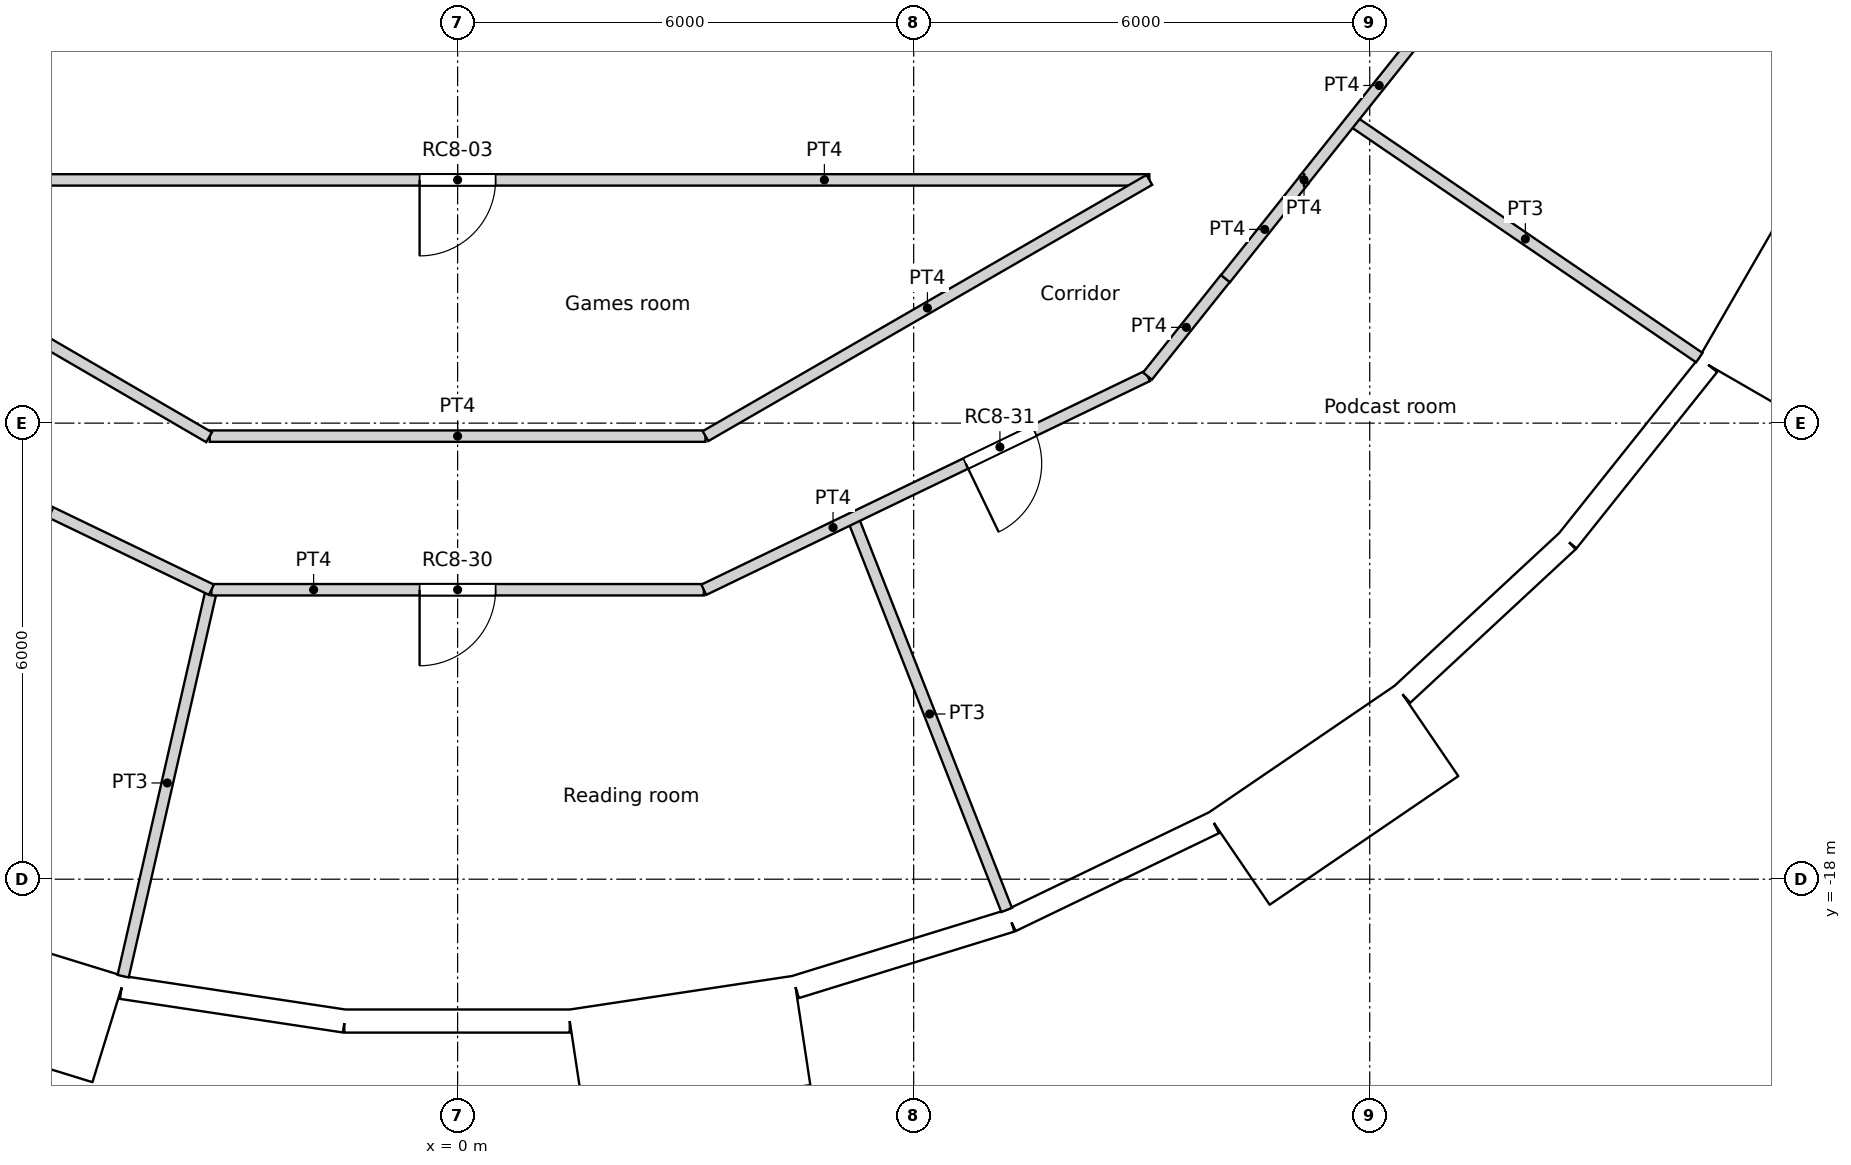
"""IFC4 building model, lengths in metres.
Left out: names, types, materials, properties, quantities, classifications, styles, units other than length and angle.
Written with IfcOpenShell. Run it as: python <this file> out.ifc"""

import sys

from ifc_helpers import new_model, si_unit, direction, frame, frame_2d, origin, origin_2d, place, context, subcontext, project, spatial, rectangle, circle, extrude, element, fill, save


model = new_model("IFC4")
c1 = context("Model", 3, precision=1e-05, world=origin(), true_north=direction((0.0, 1.0)))
c2 = subcontext(c1, "Body", "Model", "MODEL_VIEW")
j1 = project(units=[si_unit("LENGTHUNIT", "METRE"), si_unit("PLANEANGLEUNIT", "RADIAN")], contexts=[c1])
p1 = place(None, origin())
s1 = spatial("IfcSite", under=j1, at=p1, CompositionType="ELEMENT")
p2 = place(p1, origin())
s2 = spatial("IfcBuilding", under=s1, at=p2, CompositionType="ELEMENT")
p3 = place(p2, frame((0.0, 0.0, 305.4)))
s3 = spatial("IfcBuildingStorey", under=s2, at=p3, CompositionType="ELEMENT", Elevation=305.4)
for number, where, z_axis, x_axis in (
    (1, (-4.188, -18.35, 0.0), (0.0, 0.0, 1.0), (1.0, 0.0, 0.0)),
    (2, (1.406, -18.77, 0.0), (0.0, 0.0, 1.0), (1.0, 0.0, 0.0)),
    (3, (6.876, -17.521, 0.0), (0.0, 0.0, 1.0), (1.0, 0.0, 0.0)),
    (4, (11.735, -14.716, 0.0), (0.0, 0.0, 1.0), (1.0, 0.0, 0.0)),
    (5, (15.552, -10.603, 0.0), (0.0, 0.0, 1.0), (1.0, 0.0, 0.0)),
):
    element("IfcColumn", number, at=place(p3, frame(where, z_axis=z_axis, x_axis=x_axis)), inside=s3, PredefinedType="COLUMN", context=c2, shape_type="SweptSolid", body=[
        extrude(circle(Radius=0.45, at=origin_2d()), origin(), (0.0, 0.0, 1.0), 3.6),
    ])
p4 = place(p3, frame((-7.458, -19.091, -0.35), z_axis=(0.0, 0.0, 1.0), x_axis=(0.955571139978, -0.294760574774, 0.0)))
e6 = element("IfcWall", 6, at=p4, inside=s3, PredefinedType="ELEMENTEDWALL", context=c2, shape_type="SweptSolid", body=[
    extrude(rectangle(XDim=3.0, YDim=1.45, at=frame_2d((1.5, 0.0))), origin(), (0.0, 0.0, 1.0), 3.6),
])
p5 = place(p4, frame((1.5, 0.0, 1.9)))
e7 = element("IfcOpeningElement", 7, at=p5, cuts=e6, PredefinedType="OPENING", context=c2, shape_type="SweptSolid", body=[
    extrude(circle(Radius=0.9, at=origin_2d()), frame((0.0, 0.735, 0.0), z_axis=(0.0, -1.0, 0.0), x_axis=(1.0, 0.0, 0.0)), (0.0, 0.0, 1.0), 1.47),
])
p6 = place(p3, frame((-4.418, -19.425, 0.0), z_axis=(0.0, 0.0, 1.0), x_axis=(0.988835775663, -0.149009425104, 0.0)))
e8 = element("IfcWall", 8, at=p6, inside=s3, PredefinedType="SOLIDWALL", context=c2, shape_type="SweptSolid", body=[
    extrude(rectangle(XDim=2.962, YDim=0.3, at=frame_2d((1.481, 0.0))), origin(), (0.0, 0.0, 1.0), 2.8),
])
p7 = place(p6, frame((1.481, 0.0, 1.55)))
e9 = element("IfcOpeningElement", 9, at=p7, cuts=e8, PredefinedType="OPENING", context=c2, shape_type="SweptSolid", body=[
    extrude(circle(Radius=0.9, at=origin_2d()), frame((0.0, 0.16, 0.0), z_axis=(0.0, -1.0, 0.0), x_axis=(1.0, 0.0, 0.0)), (0.0, 0.0, 1.0), 0.32),
])
p8 = place(p3, frame((-1.489, -19.866, 0.0), z_axis=(0.0, 0.0, 1.0), x_axis=(1.0, 0.0, 0.0)))
e10 = element("IfcWall", 10, at=p8, inside=s3, PredefinedType="SOLIDWALL", context=c2, shape_type="SweptSolid", body=[
    extrude(rectangle(XDim=2.962, YDim=0.3, at=frame_2d((1.481, 0.0))), origin(), (0.0, 0.0, 1.0), 3.25),
])
p9 = place(p8, frame((1.481, 0.0, 1.55)))
e11 = element("IfcOpeningElement", 11, at=p9, cuts=e10, PredefinedType="OPENING", context=c2, shape_type="SweptSolid", body=[
    extrude(circle(Radius=0.9, at=origin_2d()), frame((0.0, 0.16, 0.0), z_axis=(0.0, -1.0, 0.0), x_axis=(1.0, 0.0, 0.0)), (0.0, 0.0, 1.0), 0.32),
])
p10 = place(p3, frame((1.563, -20.436, -0.35), z_axis=(0.0, 0.0, 1.0), x_axis=(0.988836445254, 0.149004981587, 0.0)))
e12 = element("IfcWall", 12, at=p10, inside=s3, PredefinedType="ELEMENTEDWALL", context=c2, shape_type="SweptSolid", body=[
    extrude(rectangle(XDim=3.0, YDim=1.45, at=frame_2d((1.5, 0.0))), origin(), (0.0, 0.0, 1.0), 3.6),
])
p11 = place(p10, frame((1.5, 0.0, 1.9)))
e13 = element("IfcOpeningElement", 13, at=p11, cuts=e12, PredefinedType="OPENING", context=c2, shape_type="SweptSolid", body=[
    extrude(circle(Radius=0.9, at=origin_2d()), frame((0.0, 0.735, 0.0), z_axis=(0.0, -1.0, 0.0), x_axis=(1.0, 0.0, 0.0)), (0.0, 0.0, 1.0), 1.47),
])
p12 = place(p3, frame((4.448, -19.418, 0.0), z_axis=(0.0, 0.0, 1.0), x_axis=(0.95558635705, 0.294711238707, 0.0)))
e14 = element("IfcWall", 14, at=p12, inside=s3, PredefinedType="SOLIDWALL", context=c2, shape_type="SweptSolid", body=[
    extrude(rectangle(XDim=2.962, YDim=0.3, at=frame_2d((1.481, 0.0))), origin(), (0.0, 0.0, 1.0), 2.8),
])
p13 = place(p12, frame((1.481, 0.0, 1.55)))
e15 = element("IfcOpeningElement", 15, at=p13, cuts=e14, PredefinedType="OPENING", context=c2, shape_type="SweptSolid", body=[
    extrude(circle(Radius=0.9, at=origin_2d()), frame((0.0, 0.16, 0.0), z_axis=(0.0, -1.0, 0.0), x_axis=(1.0, 0.0, 0.0)), (0.0, 0.0, 1.0), 0.32),
])
p14 = place(p3, frame((7.278, -18.545, 0.0), z_axis=(0.0, 0.0, 1.0), x_axis=(0.900939615635, 0.433944476838, 0.0)))
e16 = element("IfcWall", 16, at=p14, inside=s3, PredefinedType="SOLIDWALL", context=c2, shape_type="SweptSolid", body=[
    extrude(rectangle(XDim=2.962, YDim=0.3, at=frame_2d((1.481, 0.0))), origin(), (0.0, 0.0, 1.0), 3.25),
])
p15 = place(p14, frame((1.481, 0.0, 1.55)))
e17 = element("IfcOpeningElement", 17, at=p15, cuts=e16, PredefinedType="OPENING", context=c2, shape_type="SweptSolid", body=[
    extrude(circle(Radius=0.9, at=origin_2d()), frame((0.0, 0.16, 0.0), z_axis=(0.0, -1.0, 0.0), x_axis=(1.0, 0.0, 0.0)), (0.0, 0.0, 1.0), 0.32),
])
p16 = place(p3, frame((10.275, -17.734, -0.35), z_axis=(0.0, 0.0, 1.0), x_axis=(0.826246281157, 0.563309047392, 0.0)))
e18 = element("IfcWall", 18, at=p16, inside=s3, PredefinedType="ELEMENTEDWALL", context=c2, shape_type="SweptSolid", body=[
    extrude(rectangle(XDim=3.0, YDim=1.45, at=frame_2d((1.5, 0.0))), origin(), (0.0, 0.0, 1.0), 3.6),
])
p17 = place(p16, frame((1.5, 0.0, 1.9)))
e19 = element("IfcOpeningElement", 19, at=p17, cuts=e18, PredefinedType="OPENING", context=c2, shape_type="SweptSolid", body=[
    extrude(circle(Radius=0.9, at=origin_2d()), frame((0.0, 0.735, 0.0), z_axis=(0.0, -1.0, 0.0), x_axis=(1.0, 0.0, 0.0)), (0.0, 0.0, 1.0), 1.47),
])
p18 = place(p3, frame((12.432, -15.565, 0.0), z_axis=(0.0, 0.0, 1.0), x_axis=(0.733066412643, 0.680157066165, 0.0)))
e20 = element("IfcWall", 20, at=p18, inside=s3, PredefinedType="SOLIDWALL", context=c2, shape_type="SweptSolid", body=[
    extrude(rectangle(XDim=2.962, YDim=0.3, at=frame_2d((1.481, 0.0))), origin(), (0.0, 0.0, 1.0), 2.8),
])
p19 = place(p18, frame((1.481, 0.0, 1.55)))
e21 = element("IfcOpeningElement", 21, at=p19, cuts=e20, PredefinedType="OPENING", context=c2, shape_type="SweptSolid", body=[
    extrude(circle(Radius=0.9, at=origin_2d()), frame((0.0, 0.16, 0.0), z_axis=(0.0, -1.0, 0.0), x_axis=(1.0, 0.0, 0.0)), (0.0, 0.0, 1.0), 0.32),
])
p20 = place(p3, frame((14.604, -13.55, 0.0), z_axis=(0.0, 0.0, 1.0), x_axis=(0.623498236992, 0.781824755599, 0.0)))
e22 = element("IfcWall", 22, at=p20, inside=s3, PredefinedType="SOLIDWALL", context=c2, shape_type="SweptSolid", body=[
    extrude(rectangle(XDim=2.962, YDim=0.3, at=frame_2d((1.481, 0.0))), origin(), (0.0, 0.0, 1.0), 3.25),
])
p21 = place(p20, frame((1.481, 0.0, 1.55)))
e23 = element("IfcOpeningElement", 23, at=p21, cuts=e22, PredefinedType="OPENING", context=c2, shape_type="SweptSolid", body=[
    extrude(circle(Radius=0.9, at=origin_2d()), frame((0.0, 0.16, 0.0), z_axis=(0.0, -1.0, 0.0), x_axis=(1.0, 0.0, 0.0)), (0.0, 0.0, 1.0), 0.32),
])
p22 = place(p3, frame((16.952, -11.52, -0.35), z_axis=(0.0, 0.0, 1.0), x_axis=(0.499990139034, 0.866031096941, 0.0)))
e24 = element("IfcWall", 24, at=p22, inside=s3, PredefinedType="ELEMENTEDWALL", context=c2, shape_type="SweptSolid", body=[
    extrude(rectangle(XDim=3.0, YDim=1.45, at=frame_2d((1.5, 0.0))), origin(), (0.0, 0.0, 1.0), 3.6),
])
p23 = place(p22, frame((1.5, 0.0, 1.9)))
e25 = element("IfcOpeningElement", 25, at=p23, cuts=e24, PredefinedType="OPENING", context=c2, shape_type="SweptSolid", body=[
    extrude(circle(Radius=0.9, at=origin_2d()), frame((0.0, 0.735, 0.0), z_axis=(0.0, -1.0, 0.0), x_axis=(1.0, 0.0, 0.0)), (0.0, 0.0, 1.0), 1.47),
])
p24 = place(p3, frame((-9.092, -8.8, 0.0), z_axis=(0.0, 0.0, 1.0), x_axis=(1.0, 0.0, 0.0)))
e26 = element("IfcWall", 26, at=p24, inside=s3, PredefinedType="PARTITIONING", context=c2, shape_type="SweptSolid", body=[
    extrude(rectangle(XDim=18.193, YDim=0.15, at=frame_2d((9.096, 0.0))), origin(), (0.0, 0.0, 1.0), 3.25),
])
p25 = place(p24, frame((8.592, 0.0, 0.0)))
e27 = element("IfcOpeningElement", 27, at=p25, cuts=e26, PredefinedType="OPENING", context=c2, shape_type="SweptSolid", body=[
    extrude(rectangle(XDim=1.0, YDim=2.04, at=frame_2d((0.5, 1.02))), frame((0.0, 0.075, 0.0), z_axis=(0.0, -1.0, 0.0), x_axis=(1.0, 0.0, 0.0)), (0.0, 0.0, 1.0), 0.15),
])
p26 = place(p3, frame((-9.092, -8.8, 0.0), z_axis=(0.0, 0.0, 1.0), x_axis=(0.864470922103, -0.502682827277, 0.0)))
e28 = element("IfcWall", 28, at=p26, inside=s3, PredefinedType="PARTITIONING", context=c2, shape_type="SweptSolid", body=[
    extrude(rectangle(XDim=6.735, YDim=0.15, at=frame_2d((3.368, 0.0))), origin(), (0.0, 0.0, 1.0), 3.25),
])
p27 = place(p3, frame((11.137, -8.8, 0.0), z_axis=(0.0, 0.0, 1.0), x_axis=(-1.0, 0.0, 0.0)))
e29 = element("IfcWall", 29, at=p27, inside=s3, PredefinedType="PARTITIONING", context=c2, shape_type="SweptSolid", body=[
    extrude(rectangle(XDim=0.003, YDim=0.15, at=frame_2d((0.001, 0.0))), origin(), (0.0, 0.0, 1.0), 3.25),
])
p28 = place(p3, frame((10.101, -10.101, 0.0), z_axis=(0.0, 0.0, 1.0), x_axis=(0.623098344652, 0.782143498913, 0.0)))
e30 = element("IfcWall", 30, at=p28, inside=s3, PredefinedType="PARTITIONING", context=c2, shape_type="SweptSolid", body=[
    extrude(rectangle(XDim=1.661, YDim=0.15, at=frame_2d((0.831, 0.0))), origin(), (0.0, 0.0, 1.0), 3.25),
])
p29 = place(p3, frame((11.134, -8.8, 0.0), z_axis=(0.0, 0.0, 1.0), x_axis=(0.623560523309, 0.781775078761, 0.0)))
e31 = element("IfcWall", 31, at=p29, inside=s3, PredefinedType="PARTITIONING", context=c2, shape_type="SweptSolid", body=[
    extrude(rectangle(XDim=3.177, YDim=0.15, at=frame_2d((1.589, 0.0))), origin(), (0.0, 0.0, 1.0), 3.25),
])
p30 = place(p3, frame((-3.261, -12.171, 0.0), z_axis=(0.0, 0.0, 1.0), x_axis=(1.0, 0.0, 0.0)))
e32 = element("IfcWall", 32, at=p30, inside=s3, PredefinedType="PARTITIONING", context=c2, shape_type="SweptSolid", body=[
    extrude(rectangle(XDim=6.522, YDim=0.15, at=frame_2d((3.261, 0.0))), origin(), (0.0, 0.0, 1.0), 3.25),
])
p31 = place(p3, frame((3.261, -12.171, 0.0), z_axis=(0.0, 0.0, 1.0), x_axis=(0.866066809554, 0.499928276245, 0.0)))
e33 = element("IfcWall", 33, at=p31, inside=s3, PredefinedType="PARTITIONING", context=c2, shape_type="SweptSolid", body=[
    extrude(rectangle(XDim=6.743, YDim=0.15, at=frame_2d((3.371, 0.0))), origin(), (0.0, 0.0, 1.0), 3.25),
])
p32 = place(p3, frame((-9.076, -11.381, 0.0), z_axis=(0.0, 0.0, 1.0), x_axis=(0.900976027191, -0.433868872388, 0.0)))
e34 = element("IfcWall", 34, at=p32, inside=s3, PredefinedType="PARTITIONING", context=c2, shape_type="SweptSolid", body=[
    extrude(rectangle(XDim=6.479, YDim=0.15, at=frame_2d((3.239, 0.0))), origin(), (0.0, 0.0, 1.0), 3.25),
])
p33 = place(p32, frame((2.34, 0.0, 0.0)))
e35 = element("IfcOpeningElement", 35, at=p33, cuts=e34, PredefinedType="OPENING", context=c2, shape_type="SweptSolid", body=[
    extrude(rectangle(XDim=1.8, YDim=2.1, at=frame_2d((0.9, 1.05))), frame((0.0, 0.075, 0.0), z_axis=(0.0, -1.0, 0.0), x_axis=(1.0, 0.0, 0.0)), (0.0, 0.0, 1.0), 0.15),
])
p34 = place(p3, frame((3.239, -14.192, 0.0), z_axis=(0.0, 0.0, 1.0), x_axis=(0.900851590682, 0.434127183629, 0.0)))
e36 = element("IfcWall", 36, at=p34, inside=s3, PredefinedType="PARTITIONING", context=c2, shape_type="SweptSolid", body=[
    extrude(rectangle(XDim=6.479, YDim=0.15, at=frame_2d((3.239, 0.0))), origin(), (0.0, 0.0, 1.0), 3.25),
])
p35 = place(p34, frame((3.825, 0.0, 0.0)))
e37 = element("IfcOpeningElement", 37, at=p35, cuts=e36, PredefinedType="OPENING", context=c2, shape_type="SweptSolid", body=[
    extrude(rectangle(XDim=1.0, YDim=2.04, at=frame_2d((0.5, 1.02))), frame((0.0, 0.075, 0.0), z_axis=(0.0, -1.0, 0.0), x_axis=(1.0, 0.0, 0.0)), (0.0, 0.0, 1.0), 0.15),
])
p36 = place(p3, frame((-3.239, -14.192, 0.0), z_axis=(0.0, 0.0, 1.0), x_axis=(1.0, 0.0, 0.0)))
e38 = element("IfcWall", 38, at=p36, inside=s3, PredefinedType="PARTITIONING", context=c2, shape_type="SweptSolid", body=[
    extrude(rectangle(XDim=6.478, YDim=0.15, at=frame_2d((3.239, 0.0))), origin(), (0.0, 0.0, 1.0), 3.25),
])
p37 = place(p36, frame((2.739, 0.0, 0.0)))
e39 = element("IfcOpeningElement", 39, at=p37, cuts=e38, PredefinedType="OPENING", context=c2, shape_type="SweptSolid", body=[
    extrude(rectangle(XDim=1.0, YDim=2.04, at=frame_2d((0.5, 1.02))), frame((0.0, 0.075, 0.0), z_axis=(0.0, -1.0, 0.0), x_axis=(1.0, 0.0, 0.0)), (0.0, 0.0, 1.0), 0.15),
])
p38 = place(p3, frame((9.076, -11.381, 0.0), z_axis=(0.0, 0.0, 1.0), x_axis=(0.623805208652, 0.781579849829, 0.0)))
e40 = element("IfcWall", 40, at=p38, inside=s3, PredefinedType="PARTITIONING", context=c2, shape_type="SweptSolid", body=[
    extrude(rectangle(XDim=1.64, YDim=0.15, at=frame_2d((0.82, 0.0))), origin(), (0.0, 0.0, 1.0), 3.25),
])
p39 = place(p3, frame((-4.4, -19.276, 0.0), z_axis=(0.0, 0.0, 1.0), x_axis=(0.222612505682, 0.974907007008, 0.0)))
e41 = element("IfcWall", 41, at=p39, inside=s3, PredefinedType="PARTITIONING", context=c2, shape_type="SweptSolid", body=[
    extrude(rectangle(XDim=5.215, YDim=0.15, at=frame_2d((2.607, 0.0))), origin(), (0.0, 0.0, 1.0), 3.25),
])
p40 = place(p3, frame((5.199, -13.248, 0.0), z_axis=(0.0, 0.0, 1.0), x_axis=(0.365334662456, -0.930876245485, 0.0)))
e42 = element("IfcWall", 42, at=p40, inside=s3, PredefinedType="PARTITIONING", context=c2, shape_type="SweptSolid", body=[
    extrude(rectangle(XDim=5.54, YDim=0.15, at=frame_2d((2.77, 0.0))), origin(), (0.0, 0.0, 1.0), 3.25),
])
p41 = place(p3, frame((11.759, -8.017, 0.0), z_axis=(0.0, 0.0, 1.0), x_axis=(0.826207761897, -0.563365542238, 0.0)))
e43 = element("IfcWall", 43, at=p41, inside=s3, PredefinedType="PARTITIONING", context=c2, shape_type="SweptSolid", body=[
    extrude(rectangle(XDim=5.54, YDim=0.15, at=frame_2d((2.77, 0.0))), origin(), (0.0, 0.0, 1.0), 3.25),
])
p42 = place(p5, origin())
e44 = element("IfcWindow", 44, at=p42, inside=s3, PartitioningType="SINGLE_PANEL", PredefinedType="WINDOW", context=c2, shape_type="SweptSolid", body=[
    extrude(circle(Radius=0.9, at=origin_2d()), frame((0.0, 0.695, 0.0), z_axis=(0.0, -1.0, 0.0), x_axis=(1.0, 0.0, 0.0)), (0.0, 0.0, 1.0), 0.1),
])
fill(e7, e44)
p43 = place(p7, origin())
e45 = element("IfcWindow", 45, at=p43, inside=s3, PartitioningType="SINGLE_PANEL", PredefinedType="WINDOW", context=c2, shape_type="SweptSolid", body=[
    extrude(circle(Radius=0.9, at=origin_2d()), frame((0.0, 0.12, 0.0), z_axis=(0.0, -1.0, 0.0), x_axis=(1.0, 0.0, 0.0)), (0.0, 0.0, 1.0), 0.1),
])
fill(e9, e45)
p44 = place(p9, origin())
e46 = element("IfcWindow", 46, at=p44, inside=s3, PartitioningType="SINGLE_PANEL", PredefinedType="WINDOW", context=c2, shape_type="SweptSolid", body=[
    extrude(circle(Radius=0.9, at=origin_2d()), frame((0.0, 0.12, 0.0), z_axis=(0.0, -1.0, 0.0), x_axis=(1.0, 0.0, 0.0)), (0.0, 0.0, 1.0), 0.1),
])
fill(e11, e46)
p45 = place(p11, origin())
e47 = element("IfcWindow", 47, at=p45, inside=s3, PartitioningType="SINGLE_PANEL", PredefinedType="WINDOW", context=c2, shape_type="SweptSolid", body=[
    extrude(circle(Radius=0.9, at=origin_2d()), frame((0.0, 0.695, 0.0), z_axis=(0.0, -1.0, 0.0), x_axis=(1.0, 0.0, 0.0)), (0.0, 0.0, 1.0), 0.1),
])
fill(e13, e47)
p46 = place(p13, origin())
e48 = element("IfcWindow", 48, at=p46, inside=s3, PartitioningType="SINGLE_PANEL", PredefinedType="WINDOW", context=c2, shape_type="SweptSolid", body=[
    extrude(circle(Radius=0.9, at=origin_2d()), frame((0.0, 0.12, 0.0), z_axis=(0.0, -1.0, 0.0), x_axis=(1.0, 0.0, 0.0)), (0.0, 0.0, 1.0), 0.1),
])
fill(e15, e48)
p47 = place(p15, origin())
e49 = element("IfcWindow", 49, at=p47, inside=s3, PartitioningType="SINGLE_PANEL", PredefinedType="WINDOW", context=c2, shape_type="SweptSolid", body=[
    extrude(circle(Radius=0.9, at=origin_2d()), frame((0.0, 0.12, 0.0), z_axis=(0.0, -1.0, 0.0), x_axis=(1.0, 0.0, 0.0)), (0.0, 0.0, 1.0), 0.1),
])
fill(e17, e49)
p48 = place(p17, origin())
e50 = element("IfcWindow", 50, at=p48, inside=s3, PartitioningType="SINGLE_PANEL", PredefinedType="WINDOW", context=c2, shape_type="SweptSolid", body=[
    extrude(circle(Radius=0.9, at=origin_2d()), frame((0.0, 0.695, 0.0), z_axis=(0.0, -1.0, 0.0), x_axis=(1.0, 0.0, 0.0)), (0.0, 0.0, 1.0), 0.1),
])
fill(e19, e50)
p49 = place(p19, origin())
e51 = element("IfcWindow", 51, at=p49, inside=s3, PartitioningType="SINGLE_PANEL", PredefinedType="WINDOW", context=c2, shape_type="SweptSolid", body=[
    extrude(circle(Radius=0.9, at=origin_2d()), frame((0.0, 0.12, 0.0), z_axis=(0.0, -1.0, 0.0), x_axis=(1.0, 0.0, 0.0)), (0.0, 0.0, 1.0), 0.1),
])
fill(e21, e51)
p50 = place(p21, origin())
e52 = element("IfcWindow", 52, at=p50, inside=s3, PartitioningType="SINGLE_PANEL", PredefinedType="WINDOW", context=c2, shape_type="SweptSolid", body=[
    extrude(circle(Radius=0.9, at=origin_2d()), frame((0.0, 0.12, 0.0), z_axis=(0.0, -1.0, 0.0), x_axis=(1.0, 0.0, 0.0)), (0.0, 0.0, 1.0), 0.1),
])
fill(e23, e52)
p51 = place(p23, origin())
e53 = element("IfcWindow", 53, at=p51, inside=s3, PartitioningType="SINGLE_PANEL", PredefinedType="WINDOW", context=c2, shape_type="SweptSolid", body=[
    extrude(circle(Radius=0.9, at=origin_2d()), frame((0.0, 0.695, 0.0), z_axis=(0.0, -1.0, 0.0), x_axis=(1.0, 0.0, 0.0)), (0.0, 0.0, 1.0), 0.1),
])
fill(e25, e53)
p52 = place(p25, origin())
e54 = element("IfcDoor", 54, at=p52, inside=s3, OperationType="SINGLE_SWING_RIGHT", PredefinedType="DOOR", context=c2, shape_type="SweptSolid", body=[
    extrude(rectangle(XDim=1.0, YDim=2.04, at=frame_2d((0.5, 1.02))), frame((0.0, 0.025, 0.0), z_axis=(0.0, -1.0, 0.0), x_axis=(1.0, 0.0, 0.0)), (0.0, 0.0, 1.0), 0.05),
])
fill(e27, e54)
p53 = place(p37, origin())
e55 = element("IfcDoor", 55, at=p53, inside=s3, OperationType="SINGLE_SWING_RIGHT", PredefinedType="DOOR", context=c2, shape_type="SweptSolid", body=[
    extrude(rectangle(XDim=1.0, YDim=2.04, at=frame_2d((0.5, 1.02))), frame((0.0, 0.025, 0.0), z_axis=(0.0, -1.0, 0.0), x_axis=(1.0, 0.0, 0.0)), (0.0, 0.0, 1.0), 0.05),
])
fill(e39, e55)
p54 = place(p35, origin())
e56 = element("IfcDoor", 56, at=p54, inside=s3, OperationType="SINGLE_SWING_RIGHT", PredefinedType="DOOR", context=c2, shape_type="SweptSolid", body=[
    extrude(rectangle(XDim=1.0, YDim=2.04, at=frame_2d((0.5, 1.02))), frame((0.0, 0.025, 0.0), z_axis=(0.0, -1.0, 0.0), x_axis=(1.0, 0.0, 0.0)), (0.0, 0.0, 1.0), 0.05),
])
fill(e37, e56)
save(model, sys.argv[1])
